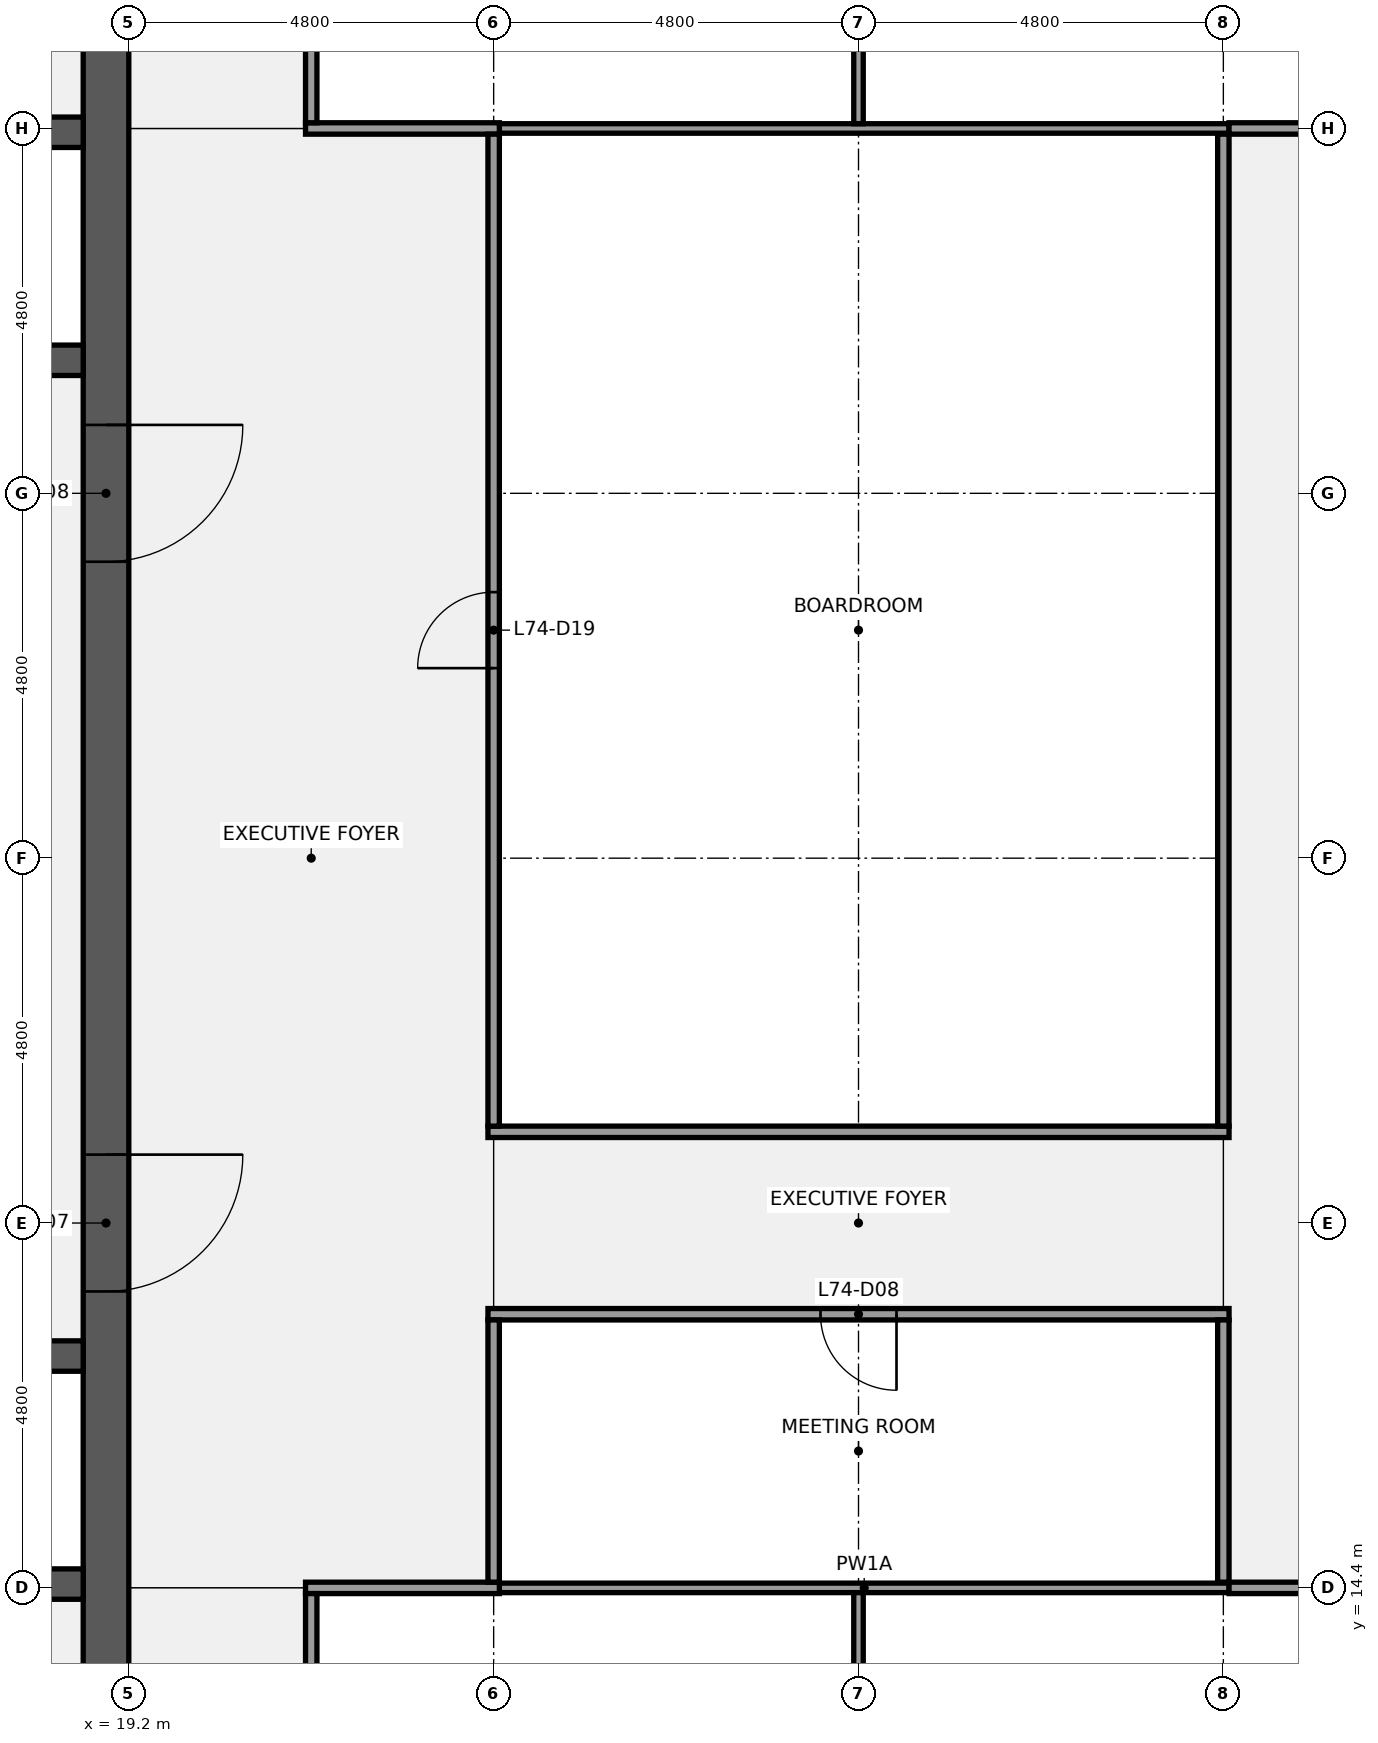
"""IFC4 building model, lengths in metres.
Left out: names, types, materials, properties, quantities, classifications, styles, units other than length and angle.
Written with IfcOpenShell. Run it as: python <this file> out.ifc"""

import sys

from ifc_helpers import new_model, si_unit, direction, frame, frame_2d, origin, place, context, subcontext, project, spatial, rectangle, extrude, element, fill, save


model = new_model("IFC4")
c1 = context("Model", 3, precision=1e-05, world=origin(), true_north=direction((0.0, 1.0)))
c2 = subcontext(c1, "Body", "Model", "MODEL_VIEW")
j1 = project(units=[si_unit("LENGTHUNIT", "METRE"), si_unit("PLANEANGLEUNIT", "RADIAN")], contexts=[c1])
p1 = place(None, origin())
s1 = spatial("IfcSite", under=j1, at=p1, CompositionType="ELEMENT")
p2 = place(p1, origin())
s2 = spatial("IfcBuilding", under=s1, at=p2, CompositionType="ELEMENT")
p3 = place(p2, frame((0.0, 0.0, 334.3)))
s3 = spatial("IfcBuildingStorey", under=s2, at=p3, CompositionType="ELEMENT", Elevation=334.3)
p4 = place(p3, frame((18.9, 38.4, 0.0), z_axis=(0.0, 0.0, 1.0), x_axis=(0.0, -1.0, 0.0)))
e1 = element("IfcWall", 1, at=p4, inside=s3, PredefinedType="SHEAR", context=c2, shape_type="SweptSolid", body=[
    extrude(rectangle(XDim=28.8, YDim=0.6, at=frame_2d((14.4, 0.0))), origin(), (0.0, 0.0, 1.0), 3.84),
])
p5 = place(p4, frame((18.3, 0.0, 0.0)))
e2 = element("IfcOpeningElement", 2, at=p5, cuts=e1, PredefinedType="OPENING", context=c2, shape_type="SweptSolid", body=[
    extrude(rectangle(XDim=1.8, YDim=2.1, at=frame_2d((0.9, 1.05))), frame((0.0, 0.31, 0.0), z_axis=(0.0, -1.0, 0.0), x_axis=(1.0, 0.0, 0.0)), (0.0, 0.0, 1.0), 0.62),
])
p6 = place(p4, frame((8.7, 0.0, 0.0)))
e3 = element("IfcOpeningElement", 3, at=p6, cuts=e1, PredefinedType="OPENING", context=c2, shape_type="SweptSolid", body=[
    extrude(rectangle(XDim=1.8, YDim=2.1, at=frame_2d((0.9, 1.05))), frame((0.0, 0.31, 0.0), z_axis=(0.0, -1.0, 0.0), x_axis=(1.0, 0.0, 0.0)), (0.0, 0.0, 1.0), 0.62),
])
p7 = place(p3, frame((0.6, 14.45, 0.0), z_axis=(0.0, 0.0, 1.0), x_axis=(1.0, 0.0, 0.0)))
e4 = element("IfcWall", 4, at=p7, inside=s3, PredefinedType="SHEAR", context=c2, shape_type="SweptSolid", body=[
    extrude(rectangle(XDim=18.0, YDim=0.4, at=frame_2d((9.0, 0.0))), origin(), (0.0, 0.0, 1.0), 3.84),
])
p8 = place(p3, frame((0.6, 17.45, 0.0), z_axis=(0.0, 0.0, 1.0), x_axis=(1.0, 0.0, 0.0)))
e5 = element("IfcWall", 5, at=p8, inside=s3, PredefinedType="SHEAR", context=c2, shape_type="SweptSolid", body=[
    extrude(rectangle(XDim=18.0, YDim=0.4, at=frame_2d((9.0, 0.0))), origin(), (0.0, 0.0, 1.0), 3.84),
])
p9 = place(p8, frame((1.863, 0.0, 0.0)))
e6 = element("IfcOpeningElement", 6, at=p9, cuts=e5, PredefinedType="OPENING", context=c2, shape_type="SweptSolid", body=[
    extrude(rectangle(XDim=1.0, YDim=2.1, at=frame_2d((0.5, 1.05))), frame((0.0, 0.21, 0.0), z_axis=(0.0, -1.0, 0.0), x_axis=(1.0, 0.0, 0.0)), (0.0, 0.0, 1.0), 0.42),
])
p10 = place(p8, frame((6.1, 0.0, 0.0)))
e7 = element("IfcOpeningElement", 7, at=p10, cuts=e5, PredefinedType="OPENING", context=c2, shape_type="SweptSolid", body=[
    extrude(rectangle(XDim=1.0, YDim=2.1, at=frame_2d((0.5, 1.05))), frame((0.0, 0.21, 0.0), z_axis=(0.0, -1.0, 0.0), x_axis=(1.0, 0.0, 0.0)), (0.0, 0.0, 1.0), 0.42),
])
p11 = place(p8, frame((9.4, 0.0, 0.0)))
e8 = element("IfcOpeningElement", 8, at=p11, cuts=e5, PredefinedType="OPENING", context=c2, shape_type="SweptSolid", body=[
    extrude(rectangle(XDim=1.0, YDim=2.1, at=frame_2d((0.5, 1.05))), frame((0.0, 0.21, 0.0), z_axis=(0.0, -1.0, 0.0), x_axis=(1.0, 0.0, 0.0)), (0.0, 0.0, 1.0), 0.42),
])
p12 = place(p8, frame((12.1, 0.0, 0.0)))
e9 = element("IfcOpeningElement", 9, at=p12, cuts=e5, PredefinedType="OPENING", context=c2, shape_type="SweptSolid", body=[
    extrude(rectangle(XDim=1.0, YDim=2.1, at=frame_2d((0.5, 1.05))), frame((0.0, 0.21, 0.0), z_axis=(0.0, -1.0, 0.0), x_axis=(1.0, 0.0, 0.0)), (0.0, 0.0, 1.0), 0.42),
])
p13 = place(p8, frame((15.438, 0.0, 0.0)))
e10 = element("IfcOpeningElement", 10, at=p13, cuts=e5, PredefinedType="OPENING", context=c2, shape_type="SweptSolid", body=[
    extrude(rectangle(XDim=1.0, YDim=2.1, at=frame_2d((0.5, 1.05))), frame((0.0, 0.21, 0.0), z_axis=(0.0, -1.0, 0.0), x_axis=(1.0, 0.0, 0.0)), (0.0, 0.0, 1.0), 0.42),
])
p14 = place(p3, frame((0.6, 30.55, 0.0), z_axis=(0.0, 0.0, 1.0), x_axis=(1.0, 0.0, 0.0)))
e11 = element("IfcWall", 11, at=p14, inside=s3, PredefinedType="SHEAR", context=c2, shape_type="SweptSolid", body=[
    extrude(rectangle(XDim=18.0, YDim=0.4, at=frame_2d((9.0, 0.0))), origin(), (0.0, 0.0, 1.0), 3.84),
])
p15 = place(p14, frame((1.6, 0.0, 0.0)))
e12 = element("IfcOpeningElement", 12, at=p15, cuts=e11, PredefinedType="OPENING", context=c2, shape_type="SweptSolid", body=[
    extrude(rectangle(XDim=1.2, YDim=2.1, at=frame_2d((0.6, 1.05))), frame((0.0, 0.21, 0.0), z_axis=(0.0, -1.0, 0.0), x_axis=(1.0, 0.0, 0.0)), (0.0, 0.0, 1.0), 0.42),
])
p16 = place(p14, frame((4.2, 0.0, 0.0)))
e13 = element("IfcOpeningElement", 13, at=p16, cuts=e11, PredefinedType="OPENING", context=c2, shape_type="SweptSolid", body=[
    extrude(rectangle(XDim=1.2, YDim=2.1, at=frame_2d((0.6, 1.05))), frame((0.0, 0.21, 0.0), z_axis=(0.0, -1.0, 0.0), x_axis=(1.0, 0.0, 0.0)), (0.0, 0.0, 1.0), 0.42),
])
p17 = place(p14, frame((6.8, 0.0, 0.0)))
e14 = element("IfcOpeningElement", 14, at=p17, cuts=e11, PredefinedType="OPENING", context=c2, shape_type="SweptSolid", body=[
    extrude(rectangle(XDim=1.2, YDim=2.1, at=frame_2d((0.6, 1.05))), frame((0.0, 0.21, 0.0), z_axis=(0.0, -1.0, 0.0), x_axis=(1.0, 0.0, 0.0)), (0.0, 0.0, 1.0), 0.42),
])
p18 = place(p14, frame((10.0, 0.0, 0.0)))
e15 = element("IfcOpeningElement", 15, at=p18, cuts=e11, PredefinedType="OPENING", context=c2, shape_type="SweptSolid", body=[
    extrude(rectangle(XDim=1.2, YDim=2.1, at=frame_2d((0.6, 1.05))), frame((0.0, 0.21, 0.0), z_axis=(0.0, -1.0, 0.0), x_axis=(1.0, 0.0, 0.0)), (0.0, 0.0, 1.0), 0.42),
])
p19 = place(p14, frame((12.6, 0.0, 0.0)))
e16 = element("IfcOpeningElement", 16, at=p19, cuts=e11, PredefinedType="OPENING", context=c2, shape_type="SweptSolid", body=[
    extrude(rectangle(XDim=1.2, YDim=2.1, at=frame_2d((0.6, 1.05))), frame((0.0, 0.21, 0.0), z_axis=(0.0, -1.0, 0.0), x_axis=(1.0, 0.0, 0.0)), (0.0, 0.0, 1.0), 0.42),
])
p20 = place(p14, frame((15.2, 0.0, 0.0)))
e17 = element("IfcOpeningElement", 17, at=p20, cuts=e11, PredefinedType="OPENING", context=c2, shape_type="SweptSolid", body=[
    extrude(rectangle(XDim=1.2, YDim=2.1, at=frame_2d((0.6, 1.05))), frame((0.0, 0.21, 0.0), z_axis=(0.0, -1.0, 0.0), x_axis=(1.0, 0.0, 0.0)), (0.0, 0.0, 1.0), 0.42),
])
p21 = place(p3, frame((0.6, 33.55, 0.0), z_axis=(0.0, 0.0, 1.0), x_axis=(1.0, 0.0, 0.0)))
e18 = element("IfcWall", 18, at=p21, inside=s3, PredefinedType="SHEAR", context=c2, shape_type="SweptSolid", body=[
    extrude(rectangle(XDim=18.0, YDim=0.4, at=frame_2d((9.0, 0.0))), origin(), (0.0, 0.0, 1.0), 3.84),
])
p22 = place(p3, frame((24.075, 14.4, 0.0), z_axis=(0.0, 0.0, 1.0), x_axis=(1.0, 0.0, 0.0)))
e19 = element("IfcWall", 19, at=p22, inside=s3, PredefinedType="PARTITIONING", context=c2, shape_type="SweptSolid", body=[
    extrude(rectangle(XDim=9.6, YDim=0.125, at=frame_2d((4.8, 0.0))), origin(), (0.0, 0.0, 1.0), 2.849),
])
p23 = place(p3, frame((21.525, 14.4, 0.0), z_axis=(0.0, 0.0, 1.0), x_axis=(1.0, 0.0, 0.0)))
e20 = element("IfcWall", 20, at=p23, inside=s3, PredefinedType="PARTITIONING", context=c2, shape_type="SweptSolid", body=[
    extrude(rectangle(XDim=2.55, YDim=0.15, at=frame_2d((1.275, 0.0))), origin(), (0.0, 0.0, 1.0), 2.849),
])
p24 = place(p3, frame((33.675, 14.4, 0.0), z_axis=(0.0, 0.0, 1.0), x_axis=(1.0, 0.0, 0.0)))
e21 = element("IfcWall", 21, at=p24, inside=s3, PredefinedType="PARTITIONING", context=c2, shape_type="SweptSolid", body=[
    extrude(rectangle(XDim=2.4, YDim=0.15, at=frame_2d((1.2, 0.0))), origin(), (0.0, 0.0, 1.0), 2.849),
])
p25 = place(p3, frame((23.925, 18.0, 0.0), z_axis=(0.0, 0.0, 1.0), x_axis=(1.0, 0.0, 0.0)))
e22 = element("IfcWall", 22, at=p25, inside=s3, PredefinedType="PARTITIONING", context=c2, shape_type="SweptSolid", body=[
    extrude(rectangle(XDim=9.75, YDim=0.15, at=frame_2d((4.875, 0.0))), origin(), (0.0, 0.0, 1.0), 2.849),
])
p26 = place(p25, frame((4.375, 0.0, 0.0)))
e23 = element("IfcOpeningElement", 23, at=p26, cuts=e22, PredefinedType="OPENING", context=c2, shape_type="SweptSolid", body=[
    extrude(rectangle(XDim=1.0, YDim=2.1, at=frame_2d((0.5, 1.05))), frame((0.0, 0.085, 0.0), z_axis=(0.0, -1.0, 0.0), x_axis=(1.0, 0.0, 0.0)), (0.0, 0.0, 1.0), 0.17),
])
p27 = place(p3, frame((23.925, 20.4, 0.0), z_axis=(0.0, 0.0, 1.0), x_axis=(1.0, 0.0, 0.0)))
e24 = element("IfcWall", 24, at=p27, inside=s3, PredefinedType="PARTITIONING", context=c2, shape_type="SweptSolid", body=[
    extrude(rectangle(XDim=9.75, YDim=0.15, at=frame_2d((4.875, 0.0))), origin(), (0.0, 0.0, 1.0), 2.849),
])
p28 = place(p3, frame((24.075, 33.6, 0.0), z_axis=(0.0, 0.0, 1.0), x_axis=(1.0, 0.0, 0.0)))
e25 = element("IfcWall", 25, at=p28, inside=s3, PredefinedType="PARTITIONING", context=c2, shape_type="SweptSolid", body=[
    extrude(rectangle(XDim=9.6, YDim=0.125, at=frame_2d((4.8, 0.0))), origin(), (0.0, 0.0, 1.0), 2.849),
])
p29 = place(p3, frame((21.525, 33.6, 0.0), z_axis=(0.0, 0.0, 1.0), x_axis=(1.0, 0.0, 0.0)))
e26 = element("IfcWall", 26, at=p29, inside=s3, PredefinedType="PARTITIONING", context=c2, shape_type="SweptSolid", body=[
    extrude(rectangle(XDim=2.55, YDim=0.15, at=frame_2d((1.275, 0.0))), origin(), (0.0, 0.0, 1.0), 2.849),
])
p30 = place(p3, frame((33.675, 33.6, 0.0), z_axis=(0.0, 0.0, 1.0), x_axis=(1.0, 0.0, 0.0)))
e27 = element("IfcWall", 27, at=p30, inside=s3, PredefinedType="PARTITIONING", context=c2, shape_type="SweptSolid", body=[
    extrude(rectangle(XDim=2.4, YDim=0.15, at=frame_2d((1.2, 0.0))), origin(), (0.0, 0.0, 1.0), 2.849),
])
for number, where, z_axis, x_axis in (
    (28, (21.6, 9.675, 0.0), (0.0, 0.0, 1.0), (0.0, 1.0, 0.0)),
    (29, (21.6, 33.675, 0.0), (0.0, 0.0, 1.0), (0.0, 1.0, 0.0)),
):
    element("IfcWall", number, at=place(p3, frame(where, z_axis=z_axis, x_axis=x_axis)), inside=s3, PredefinedType="PARTITIONING", context=c2, shape_type="SweptSolid", body=[
        extrude(rectangle(XDim=4.65, YDim=0.15, at=frame_2d((2.325, 0.0))), origin(), (0.0, 0.0, 1.0), 2.849),
    ])
p31 = place(p3, frame((24.0, 14.475, 0.0), z_axis=(0.0, 0.0, 1.0), x_axis=(0.0, 1.0, 0.0)))
e30 = element("IfcWall", 30, at=p31, inside=s3, PredefinedType="PARTITIONING", context=c2, shape_type="SweptSolid", body=[
    extrude(rectangle(XDim=3.45, YDim=0.15, at=frame_2d((1.725, 0.0))), origin(), (0.0, 0.0, 1.0), 2.849),
])
p32 = place(p3, frame((24.0, 20.475, 0.0), z_axis=(0.0, 0.0, 1.0), x_axis=(0.0, 1.0, 0.0)))
e31 = element("IfcWall", 31, at=p32, inside=s3, PredefinedType="PARTITIONING", context=c2, shape_type="SweptSolid", body=[
    extrude(rectangle(XDim=13.05, YDim=0.15, at=frame_2d((6.525, 0.0))), origin(), (0.0, 0.0, 1.0), 2.849),
])
p33 = place(p32, frame((6.025, 0.0, 0.0)))
e32 = element("IfcOpeningElement", 32, at=p33, cuts=e31, PredefinedType="OPENING", context=c2, shape_type="SweptSolid", body=[
    extrude(rectangle(XDim=1.0, YDim=2.1, at=frame_2d((0.5, 1.05))), frame((0.0, 0.085, 0.0), z_axis=(0.0, -1.0, 0.0), x_axis=(1.0, 0.0, 0.0)), (0.0, 0.0, 1.0), 0.17),
])
for number, where, z_axis, x_axis in (
    (33, (28.8, 9.675, 0.0), (0.0, 0.0, 1.0), (0.0, 1.0, 0.0)),
    (34, (28.8, 33.663, 0.0), (0.0, 0.0, 1.0), (0.0, 1.0, 0.0)),
):
    element("IfcWall", number, at=place(p3, frame(where, z_axis=z_axis, x_axis=x_axis)), inside=s3, PredefinedType="PARTITIONING", context=c2, shape_type="SweptSolid", body=[
        extrude(rectangle(XDim=4.662, YDim=0.125, at=frame_2d((2.331, 0.0))), origin(), (0.0, 0.0, 1.0), 2.849),
    ])
p34 = place(p3, frame((33.6, 14.475, 0.0), z_axis=(0.0, 0.0, 1.0), x_axis=(0.0, 1.0, 0.0)))
e35 = element("IfcWall", 35, at=p34, inside=s3, PredefinedType="PARTITIONING", context=c2, shape_type="SweptSolid", body=[
    extrude(rectangle(XDim=3.45, YDim=0.15, at=frame_2d((1.725, 0.0))), origin(), (0.0, 0.0, 1.0), 2.849),
])
p35 = place(p3, frame((33.6, 20.475, 0.0), z_axis=(0.0, 0.0, 1.0), x_axis=(0.0, 1.0, 0.0)))
e36 = element("IfcWall", 36, at=p35, inside=s3, PredefinedType="PARTITIONING", context=c2, shape_type="SweptSolid", body=[
    extrude(rectangle(XDim=13.05, YDim=0.15, at=frame_2d((6.525, 0.0))), origin(), (0.0, 0.0, 1.0), 2.849),
])
p36 = place(p5, origin())
e37 = element("IfcDoor", 37, at=p36, inside=s3, OperationType="DOUBLE_DOOR_SINGLE_SWING", PredefinedType="DOOR", context=c2, shape_type="SweptSolid", body=[
    extrude(rectangle(XDim=1.8, YDim=2.1, at=frame_2d((0.9, 1.05))), frame((0.0, 0.025, 0.0), z_axis=(0.0, -1.0, 0.0), x_axis=(1.0, 0.0, 0.0)), (0.0, 0.0, 1.0), 0.05),
])
fill(e2, e37)
p37 = place(p6, origin())
e38 = element("IfcDoor", 38, at=p37, inside=s3, OperationType="DOUBLE_DOOR_SINGLE_SWING", PredefinedType="DOOR", context=c2, shape_type="SweptSolid", body=[
    extrude(rectangle(XDim=1.8, YDim=2.1, at=frame_2d((0.9, 1.05))), frame((0.0, 0.025, 0.0), z_axis=(0.0, -1.0, 0.0), x_axis=(1.0, 0.0, 0.0)), (0.0, 0.0, 1.0), 0.05),
])
fill(e3, e38)
p38 = place(p26, origin())
e39 = element("IfcDoor", 39, at=p38, inside=s3, OperationType="SINGLE_SWING_RIGHT", PredefinedType="DOOR", context=c2, shape_type="SweptSolid", body=[
    extrude(rectangle(XDim=1.0, YDim=2.1, at=frame_2d((0.5, 1.05))), frame((0.0, 0.025, 0.0), z_axis=(0.0, -1.0, 0.0), x_axis=(1.0, 0.0, 0.0)), (0.0, 0.0, 1.0), 0.05),
])
fill(e23, e39)
p39 = place(p33, origin())
e40 = element("IfcDoor", 40, at=p39, inside=s3, OperationType="SINGLE_SWING_LEFT", PredefinedType="DOOR", context=c2, shape_type="SweptSolid", body=[
    extrude(rectangle(XDim=1.0, YDim=2.1, at=frame_2d((0.5, 1.05))), frame((0.0, 0.025, 0.0), z_axis=(0.0, -1.0, 0.0), x_axis=(1.0, 0.0, 0.0)), (0.0, 0.0, 1.0), 0.05),
])
fill(e32, e40)
save(model, sys.argv[1])
